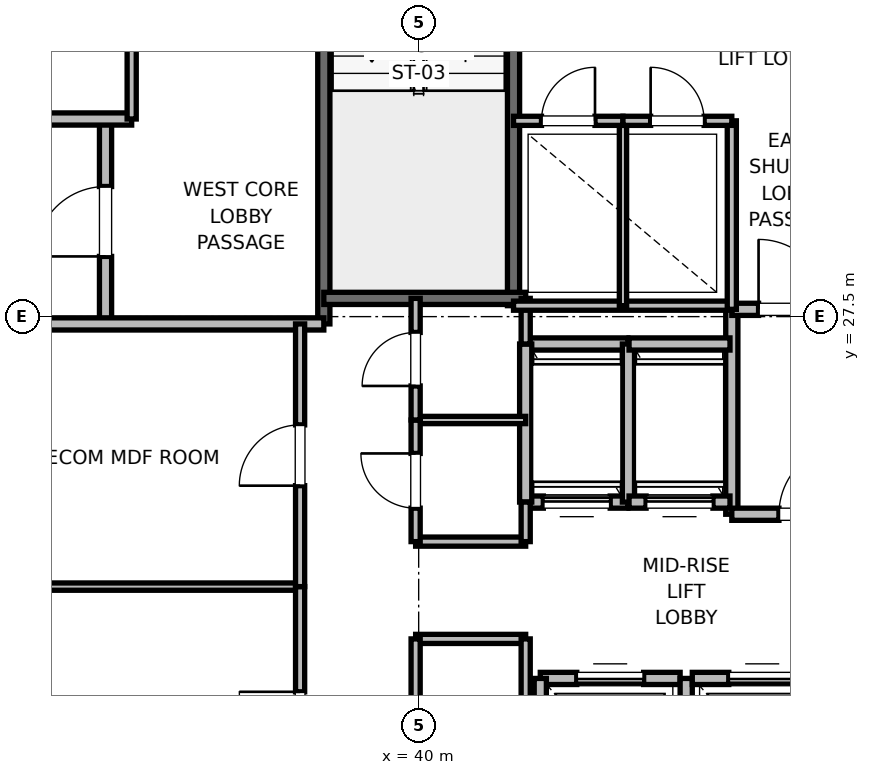
"""IFC4 building model, lengths in metres.
Left out: names, types, materials, properties, quantities, classifications, styles, units other than length and angle.
Written with IfcOpenShell. Run it as: python <this file> out.ifc"""

import sys

from ifc_helpers import new_model, si_unit, direction, frame, frame_2d, origin, place, context, subcontext, project, spatial, rectangle, extrude, element, fill, save


model = new_model("IFC4")
c1 = context("Model", 3, precision=1e-05, world=origin(), true_north=direction((0.0, 1.0)))
c2 = subcontext(c1, "Body", "Model", "MODEL_VIEW")
j1 = project(units=[si_unit("LENGTHUNIT", "METRE"), si_unit("PLANEANGLEUNIT", "RADIAN")], contexts=[c1])
p1 = place(None, origin())
s1 = spatial("IfcSite", under=j1, at=p1, CompositionType="ELEMENT")
p2 = place(p1, origin())
s2 = spatial("IfcBuilding", under=s1, at=p2, CompositionType="ELEMENT")
p3 = place(p2, frame((0.0, 0.0, 217.2)))
s3 = spatial("IfcBuildingStorey", under=s2, at=p3, CompositionType="ELEMENT", Elevation=217.2)
p4 = place(p3, frame((38.44, 27.38, 0.0), z_axis=(0.0, 0.0, 1.0), x_axis=(0.0, 1.0, 0.0)))
e1 = element("IfcWall", 1, at=p4, inside=s3, PredefinedType="SOLIDWALL", context=c2, shape_type="SweptSolid", body=[
    extrude(rectangle(XDim=8.87, YDim=0.2, at=frame_2d((4.435, 0.0))), origin(), (0.0, 0.0, 1.0), 3.775),
])
p5 = place(p3, frame((41.56, 27.68, 0.0), z_axis=(0.0, 0.0, 1.0), x_axis=(0.0, 1.0, 0.0)))
e2 = element("IfcWall", 2, at=p5, inside=s3, PredefinedType="SOLIDWALL", context=c2, shape_type="SweptSolid", body=[
    extrude(rectangle(XDim=8.57, YDim=0.2, at=frame_2d((4.285, 0.0))), origin(), (0.0, 0.0, 1.0), 3.775),
])
p6 = place(p3, frame((38.44, 27.8, 0.0), z_axis=(0.0, 0.0, 1.0), x_axis=(1.0, 0.0, 0.0)))
e3 = element("IfcWall", 3, at=p6, inside=s3, PredefinedType="SOLIDWALL", context=c2, shape_type="SweptSolid", body=[
    extrude(rectangle(XDim=3.32, YDim=0.2, at=frame_2d((1.66, 0.0))), origin(), (0.0, 0.0, 1.0), 3.775),
])
p7 = place(p3, frame((34.85, 27.38, 0.0), z_axis=(0.0, 0.0, 1.0), x_axis=(0.0, 1.0, 0.0)))
e4 = element("IfcWall", 4, at=p7, inside=s3, PredefinedType="PARTITIONING", context=c2, shape_type="SweptSolid", body=[
    extrude(rectangle(XDim=3.37, YDim=0.2, at=frame_2d((1.685, 0.0))), origin(), (0.0, 0.0, 1.0), 3.775),
])
p8 = place(p7, frame((1.11, 0.0, 0.0)))
e5 = element("IfcOpeningElement", 5, at=p8, cuts=e4, PredefinedType="OPENING", context=c2, shape_type="SweptSolid", body=[
    extrude(rectangle(XDim=1.15, YDim=2.2, at=frame_2d((0.575, 1.1))), frame((0.0, 0.1, 0.0), z_axis=(0.0, -1.0, 0.0), x_axis=(1.0, 0.0, 0.0)), (0.0, 0.0, 1.0), 0.2),
])
p9 = place(p3, frame((32.82, 27.38, 0.0), z_axis=(0.0, 0.0, 1.0), x_axis=(1.0, 0.0, 0.0)))
e6 = element("IfcWall", 6, at=p9, inside=s3, PredefinedType="PARTITIONING", context=c2, shape_type="SweptSolid", body=[
    extrude(rectangle(XDim=5.62, YDim=0.2, at=frame_2d((2.81, 0.0))), origin(), (0.0, 0.0, 1.0), 3.775),
])
p10 = place(p3, frame((32.15, 30.75, 0.0), z_axis=(0.0, 0.0, 1.0), x_axis=(1.0, 0.0, 0.0)))
e7 = element("IfcWall", 7, at=p10, inside=s3, PredefinedType="PARTITIONING", context=c2, shape_type="SweptSolid", body=[
    extrude(rectangle(XDim=3.13, YDim=0.2, at=frame_2d((1.565, 0.0))), origin(), (0.0, 0.0, 1.0), 3.775),
])
p11 = place(p3, frame((45.15, 24.25, 0.0), z_axis=(0.0, 0.0, 1.0), x_axis=(0.0, 1.0, 0.0)))
e8 = element("IfcWall", 8, at=p11, inside=s3, PredefinedType="PARTITIONING", context=c2, shape_type="SweptSolid", body=[
    extrude(rectangle(XDim=3.37, YDim=0.2, at=frame_2d((1.685, 0.0))), origin(), (0.0, 0.0, 1.0), 3.775),
])
p12 = place(p3, frame((45.15, 24.25, 0.0), z_axis=(0.0, 0.0, 1.0), x_axis=(1.0, 0.0, 0.0)))
e9 = element("IfcWall", 9, at=p12, inside=s3, PredefinedType="PARTITIONING", context=c2, shape_type="SweptSolid", body=[
    extrude(rectangle(XDim=2.7, YDim=0.2, at=frame_2d((1.35, 0.0))), origin(), (0.0, 0.0, 1.0), 3.775),
])
p13 = place(p12, frame((0.775, 0.0, 0.0)))
e10 = element("IfcOpeningElement", 10, at=p13, cuts=e9, PredefinedType="OPENING", context=c2, shape_type="SweptSolid", body=[
    extrude(rectangle(XDim=1.15, YDim=2.2, at=frame_2d((0.575, 1.1))), frame((0.0, 0.1, 0.0), z_axis=(0.0, -1.0, 0.0), x_axis=(1.0, 0.0, 0.0)), (0.0, 0.0, 1.0), 0.2),
])
p14 = place(p3, frame((45.15, 27.62, 0.0), z_axis=(0.0, 0.0, 1.0), x_axis=(1.0, 0.0, 0.0)))
e11 = element("IfcWall", 11, at=p14, inside=s3, PredefinedType="PARTITIONING", context=c2, shape_type="SweptSolid", body=[
    extrude(rectangle(XDim=2.03, YDim=0.2, at=frame_2d((1.015, 0.0))), origin(), (0.0, 0.0, 1.0), 3.775),
])
p15 = place(p14, frame((0.44, 0.0, 0.0)))
e12 = element("IfcOpeningElement", 12, at=p15, cuts=e11, PredefinedType="OPENING", context=c2, shape_type="SweptSolid", body=[
    extrude(rectangle(XDim=1.15, YDim=2.2, at=frame_2d((0.575, 1.1))), frame((0.0, 0.1, 0.0), z_axis=(0.0, -1.0, 0.0), x_axis=(1.0, 0.0, 0.0)), (0.0, 0.0, 1.0), 0.2),
])
p16 = place(p3, frame((44.3, 21.55, 0.0), z_axis=(0.0, 0.0, 1.0), x_axis=(-1.0, 0.0, 0.0)))
e13 = element("IfcWall", 13, at=p16, inside=s3, PredefinedType="SOLIDWALL", context=c2, shape_type="SweptSolid", body=[
    extrude(rectangle(XDim=2.3, YDim=0.2, at=frame_2d((1.15, 0.0))), origin(), (0.0, 0.0, 1.0), 3.775),
])
p17 = place(p16, frame((0.6, 0.0, 0.0)))
e14 = element("IfcOpeningElement", 14, at=p17, cuts=e13, PredefinedType="OPENING", context=c2, shape_type="SweptSolid", body=[
    extrude(rectangle(XDim=1.1, YDim=2.2, at=frame_2d((0.55, 1.1))), frame((0.0, 0.1, 0.0), z_axis=(0.0, -1.0, 0.0), x_axis=(1.0, 0.0, 0.0)), (0.0, 0.0, 1.0), 0.2),
])
p18 = place(p3, frame((42.0, 21.55, 0.0), z_axis=(0.0, 0.0, 1.0), x_axis=(0.0, -1.0, 0.0)))
e15 = element("IfcWall", 15, at=p18, inside=s3, PredefinedType="SOLIDWALL", context=c2, shape_type="SweptSolid", body=[
    extrude(rectangle(XDim=2.6, YDim=0.2, at=frame_2d((1.3, 0.0))), origin(), (0.0, 0.0, 1.0), 2.755),
])
p19 = place(p3, frame((44.4, 18.95, 0.0), z_axis=(0.0, 0.0, 1.0), x_axis=(0.0, 1.0, 0.0)))
e16 = element("IfcWall", 16, at=p19, inside=s3, PredefinedType="SOLIDWALL", context=c2, shape_type="SweptSolid", body=[
    extrude(rectangle(XDim=2.6, YDim=0.2, at=frame_2d((1.3, 0.0))), origin(), (0.0, 0.0, 1.0), 3.775),
])
p20 = place(p3, frame((46.8, 21.55, 0.0), z_axis=(0.0, 0.0, 1.0), x_axis=(-1.0, 0.0, 0.0)))
e17 = element("IfcWall", 17, at=p20, inside=s3, PredefinedType="SOLIDWALL", context=c2, shape_type="SweptSolid", body=[
    extrude(rectangle(XDim=2.3, YDim=0.2, at=frame_2d((1.15, 0.0))), origin(), (0.0, 0.0, 1.0), 3.775),
])
p21 = place(p20, frame((0.6, 0.0, 0.0)))
e18 = element("IfcOpeningElement", 18, at=p21, cuts=e17, PredefinedType="OPENING", context=c2, shape_type="SweptSolid", body=[
    extrude(rectangle(XDim=1.1, YDim=2.2, at=frame_2d((0.55, 1.1))), frame((0.0, 0.1, 0.0), z_axis=(0.0, -1.0, 0.0), x_axis=(1.0, 0.0, 0.0)), (0.0, 0.0, 1.0), 0.2),
])
p22 = place(p3, frame((41.76, 24.45, 0.0), z_axis=(0.0, 0.0, 1.0), x_axis=(1.0, 0.0, 0.0)))
e19 = element("IfcWall", 19, at=p22, inside=s3, PredefinedType="SOLIDWALL", context=c2, shape_type="SweptSolid", body=[
    extrude(rectangle(XDim=1.68, YDim=0.2, at=frame_2d((0.84, 0.0))), origin(), (0.0, 0.0, 1.0), 3.775),
])
p23 = place(p22, frame((0.29, 0.0, 0.0)))
e20 = element("IfcOpeningElement", 20, at=p23, cuts=e19, PredefinedType="OPENING", context=c2, shape_type="SweptSolid", body=[
    extrude(rectangle(XDim=1.1, YDim=2.2, at=frame_2d((0.55, 1.1))), frame((0.0, 0.1, 0.0), z_axis=(0.0, -1.0, 0.0), x_axis=(1.0, 0.0, 0.0)), (0.0, 0.0, 1.0), 0.2),
])
p24 = place(p3, frame((43.44, 27.05, 0.0), z_axis=(0.0, 0.0, 1.0), x_axis=(-1.0, 0.0, 0.0)))
e21 = element("IfcWall", 21, at=p24, inside=s3, PredefinedType="SOLIDWALL", context=c2, shape_type="SweptSolid", body=[
    extrude(rectangle(XDim=1.68, YDim=0.2, at=frame_2d((0.84, 0.0))), origin(), (0.0, 0.0, 1.0), 3.775),
])
for number, where, z_axis, x_axis in (
    (22, (41.76, 27.05, 0.0), (0.0, 0.0, 1.0), (0.0, -1.0, 0.0)),
    (23, (43.45, 24.45, 0.0), (0.0, 0.0, 1.0), (0.0, 1.0, 0.0)),
):
    element("IfcWall", number, at=place(p3, frame(where, z_axis=z_axis, x_axis=x_axis)), inside=s3, PredefinedType="SOLIDWALL", context=c2, shape_type="SweptSolid", body=[
        extrude(rectangle(XDim=2.6, YDim=0.2, at=frame_2d((1.3, 0.0))), origin(), (0.0, 0.0, 1.0), 3.775),
    ])
p25 = place(p3, frame((43.46, 24.45, 0.0), z_axis=(0.0, 0.0, 1.0), x_axis=(1.0, 0.0, 0.0)))
e24 = element("IfcWall", 24, at=p25, inside=s3, PredefinedType="SOLIDWALL", context=c2, shape_type="SweptSolid", body=[
    extrude(rectangle(XDim=1.66, YDim=0.2, at=frame_2d((0.83, 0.0))), origin(), (0.0, 0.0, 1.0), 3.775),
])
p26 = place(p25, frame((0.28, 0.0, 0.0)))
e25 = element("IfcOpeningElement", 25, at=p26, cuts=e24, PredefinedType="OPENING", context=c2, shape_type="SweptSolid", body=[
    extrude(rectangle(XDim=1.1, YDim=2.2, at=frame_2d((0.55, 1.1))), frame((0.0, 0.1, 0.0), z_axis=(0.0, -1.0, 0.0), x_axis=(1.0, 0.0, 0.0)), (0.0, 0.0, 1.0), 0.2),
])
p27 = place(p3, frame((45.12, 27.05, 0.0), z_axis=(0.0, 0.0, 1.0), x_axis=(-1.0, 0.0, 0.0)))
e26 = element("IfcWall", 26, at=p27, inside=s3, PredefinedType="SOLIDWALL", context=c2, shape_type="SweptSolid", body=[
    extrude(rectangle(XDim=1.66, YDim=0.2, at=frame_2d((0.83, 0.0))), origin(), (0.0, 0.0, 1.0), 3.775),
])
for number, where, z_axis, x_axis in (
    (27, (39.95, 22.2, 0.0), (0.0, 0.0, 1.0), (1.0, 0.0, 0.0)),
    (28, (39.95, 23.8, 0.0), (0.0, 0.0, 1.0), (1.0, 0.0, 0.0)),
):
    element("IfcWall", number, at=place(p3, frame(where, z_axis=z_axis, x_axis=x_axis)), inside=s3, PredefinedType="PARTITIONING", context=c2, shape_type="SweptSolid", body=[
        extrude(rectangle(XDim=1.81, YDim=0.15, at=frame_2d((0.905, 0.0))), origin(), (0.0, 0.0, 1.0), 2.85),
    ])
p28 = place(p3, frame((39.95, 25.8, 0.0), z_axis=(0.0, 0.0, 1.0), x_axis=(1.0, 0.0, 0.0)))
e29 = element("IfcWall", 29, at=p28, inside=s3, PredefinedType="PARTITIONING", context=c2, shape_type="SweptSolid", body=[
    extrude(rectangle(XDim=1.81, YDim=0.12, at=frame_2d((0.905, 0.0))), origin(), (0.0, 0.0, 1.0), 2.85),
])
p29 = place(p3, frame((41.76, 18.6, 0.0), z_axis=(0.0, 0.0, 1.0), x_axis=(0.0, 1.0, 0.0)))
e30 = element("IfcWall", 30, at=p29, inside=s3, PredefinedType="PARTITIONING", context=c2, shape_type="SweptSolid", body=[
    extrude(rectangle(XDim=3.6, YDim=0.15, at=frame_2d((1.8, 0.0))), origin(), (0.0, 0.0, 1.0), 2.755),
])
p30 = place(p3, frame((41.76, 23.8, 0.0), z_axis=(0.0, 0.0, 1.0), x_axis=(0.0, 1.0, 0.0)))
e31 = element("IfcWall", 31, at=p30, inside=s3, PredefinedType="PARTITIONING", context=c2, shape_type="SweptSolid", body=[
    extrude(rectangle(XDim=0.65, YDim=0.15, at=frame_2d((0.325, 0.0))), origin(), (0.0, 0.0, 1.0), 2.85),
])
p31 = place(p3, frame((41.76, 27.05, 0.0), z_axis=(0.0, 0.0, 1.0), x_axis=(0.0, 1.0, 0.0)))
e32 = element("IfcWall", 32, at=p31, inside=s3, PredefinedType="PARTITIONING", context=c2, shape_type="SweptSolid", body=[
    extrude(rectangle(XDim=0.75, YDim=0.15, at=frame_2d((0.375, 0.0))), origin(), (0.0, 0.0, 1.0), 2.85),
])
p32 = place(p3, frame((39.95, 19.2, 0.0), z_axis=(0.0, 0.0, 1.0), x_axis=(0.0, 1.0, 0.0)))
e33 = element("IfcWall", 33, at=p32, inside=s3, PredefinedType="PARTITIONING", context=c2, shape_type="SweptSolid", body=[
    extrude(rectangle(XDim=3.0, YDim=0.15, at=frame_2d((1.5, 0.0))), origin(), (0.0, 0.0, 1.0), 2.85),
])
p33 = place(p32, frame((1.05, 0.0, 0.0)))
e34 = element("IfcOpeningElement", 34, at=p33, cuts=e33, PredefinedType="OPENING", context=c2, shape_type="SweptSolid", body=[
    extrude(rectangle(XDim=0.9, YDim=2.1, at=frame_2d((0.45, 1.05))), frame((0.0, 0.075, 0.0), z_axis=(0.0, -1.0, 0.0), x_axis=(1.0, 0.0, 0.0)), (0.0, 0.0, 1.0), 0.15),
])
p34 = place(p3, frame((39.95, 23.8, 0.0), z_axis=(0.0, 0.0, 1.0), x_axis=(0.0, 1.0, 0.0)))
e35 = element("IfcWall", 35, at=p34, inside=s3, PredefinedType="PARTITIONING", context=c2, shape_type="SweptSolid", body=[
    extrude(rectangle(XDim=2.0, YDim=0.15, at=frame_2d((1.0, 0.0))), origin(), (0.0, 0.0, 1.0), 2.85),
])
p35 = place(p34, frame((0.55, 0.0, 0.0)))
e36 = element("IfcOpeningElement", 36, at=p35, cuts=e35, PredefinedType="OPENING", context=c2, shape_type="SweptSolid", body=[
    extrude(rectangle(XDim=0.9, YDim=2.1, at=frame_2d((0.45, 1.05))), frame((0.0, 0.075, 0.0), z_axis=(0.0, -1.0, 0.0), x_axis=(1.0, 0.0, 0.0)), (0.0, 0.0, 1.0), 0.15),
])
p36 = place(p3, frame((39.95, 25.8, 0.0), z_axis=(0.0, 0.0, 1.0), x_axis=(0.0, 1.0, 0.0)))
e37 = element("IfcWall", 37, at=p36, inside=s3, PredefinedType="PARTITIONING", context=c2, shape_type="SweptSolid", body=[
    extrude(rectangle(XDim=2.0, YDim=0.15, at=frame_2d((1.0, 0.0))), origin(), (0.0, 0.0, 1.0), 2.85),
])
p37 = place(p36, frame((0.56, 0.0, 0.0)))
e38 = element("IfcOpeningElement", 38, at=p37, cuts=e37, PredefinedType="OPENING", context=c2, shape_type="SweptSolid", body=[
    extrude(rectangle(XDim=0.88, YDim=2.1, at=frame_2d((0.44, 1.05))), frame((0.0, 0.075, 0.0), z_axis=(0.0, -1.0, 0.0), x_axis=(1.0, 0.0, 0.0)), (0.0, 0.0, 1.0), 0.15),
])
p38 = place(p3, frame((35.28, 30.75, 0.0), z_axis=(0.0, 0.0, 1.0), x_axis=(0.0, 1.0, 0.0)))
e39 = element("IfcWall", 39, at=p38, inside=s3, PredefinedType="PARTITIONING", context=c2, shape_type="SweptSolid", body=[
    extrude(rectangle(XDim=3.2, YDim=0.15, at=frame_2d((1.6, 0.0))), origin(), (0.0, 0.0, 1.0), 2.85),
])
p39 = place(p38, frame((1.15, 0.0, 0.0)))
e40 = element("IfcOpeningElement", 40, at=p39, cuts=e39, PredefinedType="OPENING", context=c2, shape_type="SweptSolid", body=[
    extrude(rectangle(XDim=0.9, YDim=2.1, at=frame_2d((0.45, 1.05))), frame((0.0, 0.075, 0.0), z_axis=(0.0, -1.0, 0.0), x_axis=(1.0, 0.0, 0.0)), (0.0, 0.0, 1.0), 0.15),
])
p40 = place(p3, frame((32.82, 23.06, 0.0), z_axis=(0.0, 0.0, 1.0), x_axis=(1.0, 0.0, 0.0)))
e41 = element("IfcWall", 41, at=p40, inside=s3, PredefinedType="PARTITIONING", context=c2, shape_type="SweptSolid", body=[
    extrude(rectangle(XDim=5.23, YDim=0.12, at=frame_2d((2.615, 0.0))), origin(), (0.0, 0.0, 1.0), 2.85),
])
p41 = place(p3, frame((38.05, 18.6, 0.0), z_axis=(0.0, 0.0, 1.0), x_axis=(0.0, 1.0, 0.0)))
e42 = element("IfcWall", 42, at=p41, inside=s3, PredefinedType="PARTITIONING", context=c2, shape_type="SweptSolid", body=[
    extrude(rectangle(XDim=4.46, YDim=0.15, at=frame_2d((2.23, 0.0))), origin(), (0.0, 0.0, 1.0), 2.755),
])
p42 = place(p41, frame((1.73, 0.0, 0.0)))
e43 = element("IfcOpeningElement", 43, at=p42, cuts=e42, PredefinedType="OPENING", context=c2, shape_type="SweptSolid", body=[
    extrude(rectangle(XDim=1.0, YDim=2.15, at=frame_2d((0.5, 1.075))), frame((0.0, 0.075, 0.0), z_axis=(0.0, -1.0, 0.0), x_axis=(1.0, 0.0, 0.0)), (0.0, 0.0, 1.0), 0.15),
])
p43 = place(p3, frame((38.05, 23.06, 0.0), z_axis=(0.0, 0.0, 1.0), x_axis=(0.0, 1.0, 0.0)))
e44 = element("IfcWall", 44, at=p43, inside=s3, PredefinedType="PARTITIONING", context=c2, shape_type="SweptSolid", body=[
    extrude(rectangle(XDim=4.32, YDim=0.15, at=frame_2d((2.16, 0.0))), origin(), (0.0, 0.0, 1.0), 2.85),
])
p44 = place(p43, frame((1.66, 0.0, 0.0)))
e45 = element("IfcOpeningElement", 45, at=p44, cuts=e44, PredefinedType="OPENING", context=c2, shape_type="SweptSolid", body=[
    extrude(rectangle(XDim=1.0, YDim=2.15, at=frame_2d((0.5, 1.075))), frame((0.0, 0.075, 0.0), z_axis=(0.0, -1.0, 0.0), x_axis=(1.0, 0.0, 0.0)), (0.0, 0.0, 1.0), 0.15),
])
p45 = place(p3, frame((41.56, 27.68, 0.0), z_axis=(0.0, 0.0, 1.0), x_axis=(1.0, 0.0, 0.0)))
e46 = element("IfcWall", 46, at=p45, inside=s3, PredefinedType="PARTITIONING", context=c2, shape_type="SweptSolid", body=[
    extrude(rectangle(XDim=3.59, YDim=0.15, at=frame_2d((1.795, 0.0))), origin(), (0.0, 0.0, 1.0), 2.85),
])
p46 = place(p3, frame((45.15, 27.62, 0.0), z_axis=(0.0, 0.0, 1.0), x_axis=(0.0, 1.0, 0.0)))
e47 = element("IfcWall", 47, at=p46, inside=s3, PredefinedType="PARTITIONING", context=c2, shape_type="SweptSolid", body=[
    extrude(rectangle(XDim=3.1, YDim=0.15, at=frame_2d((1.55, 0.0))), origin(), (0.0, 0.0, 1.0), 2.85),
])
p47 = place(p3, frame((43.36, 27.68, 0.0), z_axis=(0.0, 0.0, 1.0), x_axis=(0.0, 1.0, 0.0)))
e48 = element("IfcWall", 48, at=p47, inside=s3, PredefinedType="PARTITIONING", context=c2, shape_type="SweptSolid", body=[
    extrude(rectangle(XDim=3.04, YDim=0.12, at=frame_2d((1.52, 0.0))), origin(), (0.0, 0.0, 1.0), 2.85),
])
p48 = place(p3, frame((41.56, 30.72, 0.0), z_axis=(0.0, 0.0, 1.0), x_axis=(1.0, 0.0, 0.0)))
e49 = element("IfcWall", 49, at=p48, inside=s3, PredefinedType="PARTITIONING", context=c2, shape_type="SweptSolid", body=[
    extrude(rectangle(XDim=1.8, YDim=0.15, at=frame_2d((0.9, 0.0))), origin(), (0.0, 0.0, 1.0), 2.85),
])
p49 = place(p48, frame((0.46, 0.0, 0.0)))
e50 = element("IfcOpeningElement", 50, at=p49, cuts=e49, PredefinedType="OPENING", context=c2, shape_type="SweptSolid", body=[
    extrude(rectangle(XDim=0.88, YDim=2.1, at=frame_2d((0.44, 1.05))), frame((0.0, 0.075, 0.0), z_axis=(0.0, -1.0, 0.0), x_axis=(1.0, 0.0, 0.0)), (0.0, 0.0, 1.0), 0.15),
])
p50 = place(p3, frame((43.36, 30.72, 0.0), z_axis=(0.0, 0.0, 1.0), x_axis=(1.0, 0.0, 0.0)))
e51 = element("IfcWall", 51, at=p50, inside=s3, PredefinedType="PARTITIONING", context=c2, shape_type="SweptSolid", body=[
    extrude(rectangle(XDim=1.79, YDim=0.15, at=frame_2d((0.895, 0.0))), origin(), (0.0, 0.0, 1.0), 2.85),
])
p51 = place(p50, frame((0.455, 0.0, 0.0)))
e52 = element("IfcOpeningElement", 52, at=p51, cuts=e51, PredefinedType="OPENING", context=c2, shape_type="SweptSolid", body=[
    extrude(rectangle(XDim=0.88, YDim=2.1, at=frame_2d((0.44, 1.05))), frame((0.0, 0.075, 0.0), z_axis=(0.0, -1.0, 0.0), x_axis=(1.0, 0.0, 0.0)), (0.0, 0.0, 1.0), 0.15),
])
p52 = place(p8, origin())
e53 = element("IfcDoor", 53, at=p52, inside=s3, OperationType="SINGLE_SWING_LEFT", PredefinedType="DOOR", context=c2, shape_type="SweptSolid", body=[
    extrude(rectangle(XDim=1.15, YDim=2.2, at=frame_2d((0.575, 1.1))), frame((0.0, 0.025, 0.0), z_axis=(0.0, -1.0, 0.0), x_axis=(1.0, 0.0, 0.0)), (0.0, 0.0, 1.0), 0.05),
])
fill(e5, e53)
p53 = place(p13, origin())
e54 = element("IfcDoor", 54, at=p53, inside=s3, OperationType="SINGLE_SWING_RIGHT", PredefinedType="DOOR", context=c2, shape_type="SweptSolid", body=[
    extrude(rectangle(XDim=1.15, YDim=2.2, at=frame_2d((0.575, 1.1))), frame((0.0, 0.025, 0.0), z_axis=(0.0, -1.0, 0.0), x_axis=(1.0, 0.0, 0.0)), (0.0, 0.0, 1.0), 0.05),
])
fill(e10, e54)
p54 = place(p15, origin())
e55 = element("IfcDoor", 55, at=p54, inside=s3, OperationType="SINGLE_SWING_LEFT", PredefinedType="DOOR", context=c2, shape_type="SweptSolid", body=[
    extrude(rectangle(XDim=1.15, YDim=2.2, at=frame_2d((0.575, 1.1))), frame((0.0, 0.025, 0.0), z_axis=(0.0, -1.0, 0.0), x_axis=(1.0, 0.0, 0.0)), (0.0, 0.0, 1.0), 0.05),
])
fill(e12, e55)
p55 = place(p17, origin())
e56 = element("IfcDoor", 56, at=p55, inside=s3, OperationType="SLIDING_TO_RIGHT", PredefinedType="DOOR", context=c2, shape_type="SweptSolid", body=[
    extrude(rectangle(XDim=1.1, YDim=2.2, at=frame_2d((0.55, 1.1))), frame((0.0, 0.025, 0.0), z_axis=(0.0, -1.0, 0.0), x_axis=(1.0, 0.0, 0.0)), (0.0, 0.0, 1.0), 0.05),
])
fill(e14, e56)
p56 = place(p21, origin())
e57 = element("IfcDoor", 57, at=p56, inside=s3, OperationType="SLIDING_TO_RIGHT", PredefinedType="DOOR", context=c2, shape_type="SweptSolid", body=[
    extrude(rectangle(XDim=1.1, YDim=2.2, at=frame_2d((0.55, 1.1))), frame((0.0, 0.025, 0.0), z_axis=(0.0, -1.0, 0.0), x_axis=(1.0, 0.0, 0.0)), (0.0, 0.0, 1.0), 0.05),
])
fill(e18, e57)
p57 = place(p23, origin())
e58 = element("IfcDoor", 58, at=p57, inside=s3, OperationType="SLIDING_TO_RIGHT", PredefinedType="DOOR", context=c2, shape_type="SweptSolid", body=[
    extrude(rectangle(XDim=1.1, YDim=2.2, at=frame_2d((0.55, 1.1))), frame((0.0, 0.025, 0.0), z_axis=(0.0, -1.0, 0.0), x_axis=(1.0, 0.0, 0.0)), (0.0, 0.0, 1.0), 0.05),
])
fill(e20, e58)
p58 = place(p26, origin())
e59 = element("IfcDoor", 59, at=p58, inside=s3, OperationType="SLIDING_TO_RIGHT", PredefinedType="DOOR", context=c2, shape_type="SweptSolid", body=[
    extrude(rectangle(XDim=1.1, YDim=2.2, at=frame_2d((0.55, 1.1))), frame((0.0, 0.025, 0.0), z_axis=(0.0, -1.0, 0.0), x_axis=(1.0, 0.0, 0.0)), (0.0, 0.0, 1.0), 0.05),
])
fill(e25, e59)
p59 = place(p35, origin())
e60 = element("IfcDoor", 60, at=p59, inside=s3, OperationType="SINGLE_SWING_RIGHT", PredefinedType="DOOR", context=c2, shape_type="SweptSolid", body=[
    extrude(rectangle(XDim=0.9, YDim=2.1, at=frame_2d((0.45, 1.05))), frame((0.0, 0.025, 0.0), z_axis=(0.0, -1.0, 0.0), x_axis=(1.0, 0.0, 0.0)), (0.0, 0.0, 1.0), 0.05),
])
fill(e36, e60)
p60 = place(p37, origin())
e61 = element("IfcDoor", 61, at=p60, inside=s3, OperationType="SINGLE_SWING_LEFT", PredefinedType="DOOR", context=c2, shape_type="SweptSolid", body=[
    extrude(rectangle(XDim=0.88, YDim=2.1, at=frame_2d((0.44, 1.05))), frame((0.0, 0.025, 0.0), z_axis=(0.0, -1.0, 0.0), x_axis=(1.0, 0.0, 0.0)), (0.0, 0.0, 1.0), 0.05),
])
fill(e38, e61)
p61 = place(p42, origin())
e62 = element("IfcDoor", 62, at=p61, inside=s3, OperationType="SINGLE_SWING_RIGHT", PredefinedType="DOOR", context=c2, shape_type="SweptSolid", body=[
    extrude(rectangle(XDim=1.0, YDim=2.15, at=frame_2d((0.5, 1.075))), frame((0.0, 0.025, 0.0), z_axis=(0.0, -1.0, 0.0), x_axis=(1.0, 0.0, 0.0)), (0.0, 0.0, 1.0), 0.05),
])
fill(e43, e62)
p62 = place(p44, origin())
e63 = element("IfcDoor", 63, at=p62, inside=s3, OperationType="SINGLE_SWING_LEFT", PredefinedType="DOOR", context=c2, shape_type="SweptSolid", body=[
    extrude(rectangle(XDim=1.0, YDim=2.15, at=frame_2d((0.5, 1.075))), frame((0.0, 0.025, 0.0), z_axis=(0.0, -1.0, 0.0), x_axis=(1.0, 0.0, 0.0)), (0.0, 0.0, 1.0), 0.05),
])
fill(e45, e63)
p63 = place(p49, origin())
e64 = element("IfcDoor", 64, at=p63, inside=s3, OperationType="SINGLE_SWING_RIGHT", PredefinedType="DOOR", context=c2, shape_type="SweptSolid", body=[
    extrude(rectangle(XDim=0.88, YDim=2.1, at=frame_2d((0.44, 1.05))), frame((0.0, 0.025, 0.0), z_axis=(0.0, -1.0, 0.0), x_axis=(1.0, 0.0, 0.0)), (0.0, 0.0, 1.0), 0.05),
])
fill(e50, e64)
p64 = place(p51, origin())
e65 = element("IfcDoor", 65, at=p64, inside=s3, OperationType="SINGLE_SWING_LEFT", PredefinedType="DOOR", context=c2, shape_type="SweptSolid", body=[
    extrude(rectangle(XDim=0.88, YDim=2.1, at=frame_2d((0.44, 1.05))), frame((0.0, 0.025, 0.0), z_axis=(0.0, -1.0, 0.0), x_axis=(1.0, 0.0, 0.0)), (0.0, 0.0, 1.0), 0.05),
])
fill(e52, e65)
save(model, sys.argv[1])
